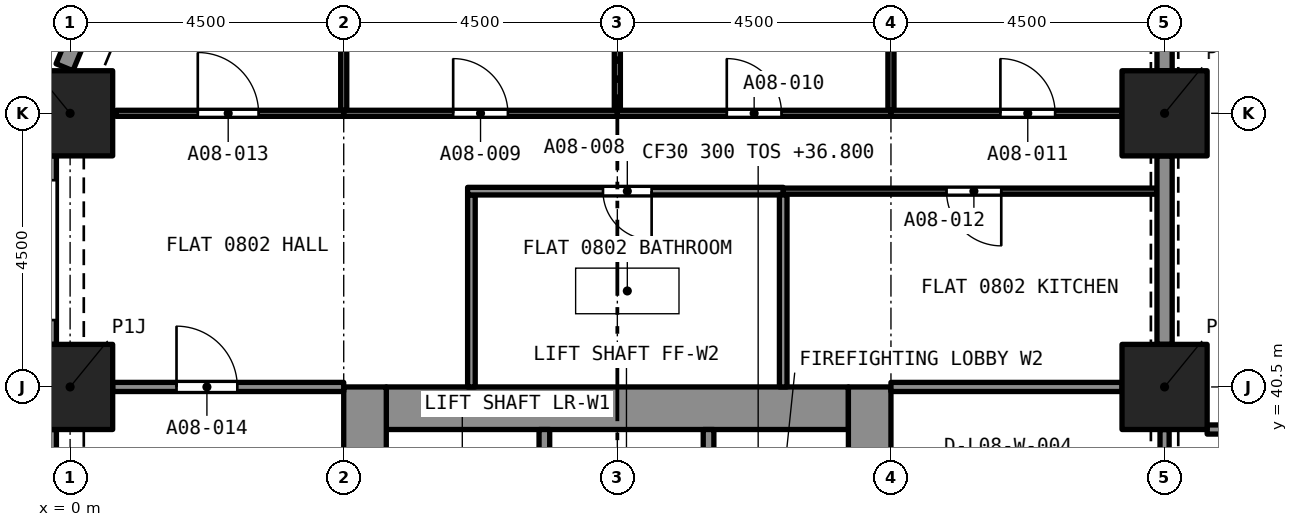
"""IFC4 building model, lengths in metres.
Left out: names, types, materials, properties, quantities, classifications, styles, units other than length and angle.
Written with IfcOpenShell. Run it as: python <this file> out.ifc"""

import sys

from ifc_helpers import new_model, si_unit, direction, frame, frame_2d, origin, origin_2d, place, context, subcontext, project, spatial, rectangle, extrude, element, fill, save


model = new_model("IFC4")
c1 = context("Model", 3, precision=1e-05, world=origin(), true_north=direction((0.0, 1.0)))
c2 = subcontext(c1, "Body", "Model", "MODEL_VIEW")
j1 = project(units=[si_unit("LENGTHUNIT", "METRE"), si_unit("PLANEANGLEUNIT", "RADIAN")], contexts=[c1])
p1 = place(None, origin())
s1 = spatial("IfcSite", under=j1, at=p1, CompositionType="ELEMENT")
p2 = place(p1, origin())
s2 = spatial("IfcBuilding", under=s1, at=p2, CompositionType="ELEMENT")
p3 = place(p2, frame((0.0, 0.0, 36.8)))
s3 = spatial("IfcBuildingStorey", under=s2, at=p3, CompositionType="ELEMENT", Elevation=36.8)
for number, where, z_axis, x_axis in (
    (1, (0.0, 40.5, 0.0), (0.0, 0.0, 1.0), (1.0, 0.0, 0.0)),
    (2, (18.0, 40.5, 0.0), (0.0, 0.0, 1.0), (1.0, 0.0, 0.0)),
    (3, (0.0, 45.0, 0.0), (0.0, 0.0, 1.0), (1.0, 0.0, 0.0)),
    (4, (18.0, 45.0, 0.0), (0.0, 0.0, 1.0), (1.0, 0.0, 0.0)),
):
    element("IfcColumn", number, at=place(p3, frame(where, z_axis=z_axis, x_axis=x_axis)), inside=s3, PredefinedType="COLUMN", context=c2, shape_type="SweptSolid", body=[
        extrude(rectangle(XDim=1.4, YDim=1.4, at=origin_2d()), origin(), (0.0, 0.0, 1.0), 3.2),
    ])
p4 = place(p3, frame((5.2, 40.15, 0.0), z_axis=(0.0, 0.0, 1.0), x_axis=(1.0, 0.0, 0.0)))
e5 = element("IfcWall", 5, at=p4, inside=s3, PredefinedType="SOLIDWALL", context=c2, shape_type="SweptSolid", body=[
    extrude(rectangle(XDim=7.6, YDim=0.7, at=frame_2d((3.8, 0.0))), origin(), (0.0, 0.0, 1.0), 3.2),
])
p5 = place(p3, frame((4.85, 27.0, 0.0), z_axis=(0.0, 0.0, 1.0), x_axis=(0.0, 1.0, 0.0)))
e6 = element("IfcWall", 6, at=p5, inside=s3, PredefinedType="SOLIDWALL", context=c2, shape_type="SweptSolid", body=[
    extrude(rectangle(XDim=13.5, YDim=0.7, at=frame_2d((6.75, 0.0))), origin(), (0.0, 0.0, 1.0), 3.2),
])
p6 = place(p5, frame((8.95, 0.0, 0.0)))
e7 = element("IfcOpeningElement", 7, at=p6, cuts=e6, PredefinedType="OPENING", context=c2, shape_type="SweptSolid", body=[
    extrude(rectangle(XDim=1.2, YDim=2.1, at=frame_2d((0.6, 1.05))), frame((0.0, 0.36, 0.0), z_axis=(0.0, -1.0, 0.0), x_axis=(1.0, 0.0, 0.0)), (0.0, 0.0, 1.0), 0.72),
])
p7 = place(p3, frame((13.15, 27.0, 0.0), z_axis=(0.0, 0.0, 1.0), x_axis=(0.0, 1.0, 0.0)))
e8 = element("IfcWall", 8, at=p7, inside=s3, PredefinedType="SOLIDWALL", context=c2, shape_type="SweptSolid", body=[
    extrude(rectangle(XDim=13.5, YDim=0.7, at=frame_2d((6.75, 0.0))), origin(), (0.0, 0.0, 1.0), 3.2),
])
p8 = place(p7, frame((11.1, 0.0, 0.0)))
e9 = element("IfcOpeningElement", 9, at=p8, cuts=e8, PredefinedType="OPENING", context=c2, shape_type="SweptSolid", body=[
    extrude(rectangle(XDim=1.1, YDim=2.1, at=frame_2d((0.55, 1.05))), frame((0.0, 0.36, 0.0), z_axis=(0.0, -1.0, 0.0), x_axis=(1.0, 0.0, 0.0)), (0.0, 0.0, 1.0), 0.72),
])
p9 = place(p7, frame((8.95, 0.0, 0.0)))
e10 = element("IfcOpeningElement", 10, at=p9, cuts=e8, PredefinedType="OPENING", context=c2, shape_type="SweptSolid", body=[
    extrude(rectangle(XDim=1.2, YDim=2.1, at=frame_2d((0.6, 1.05))), frame((0.0, 0.36, 0.0), z_axis=(0.0, -1.0, 0.0), x_axis=(1.0, 0.0, 0.0)), (0.0, 0.0, 1.0), 0.72),
])
p10 = place(p3, frame((-0.092, 45.757, 0.0), z_axis=(0.0, 0.0, 1.0), x_axis=(0.382737135771, 0.923857286003, 0.0)))
e11 = element("IfcWall", 11, at=p10, inside=s3, PredefinedType="SOLIDWALL", context=c2, shape_type="SweptSolid", body=[
    extrude(rectangle(XDim=1.865, YDim=0.3, at=frame_2d((0.933, 0.0))), origin(), (0.0, 0.0, 1.0), 3.2),
])
p11 = place(p10, frame((0.508, 0.0, 0.45)))
e12 = element("IfcOpeningElement", 12, at=p11, cuts=e11, PredefinedType="OPENING", context=c2, shape_type="SweptSolid", body=[
    extrude(rectangle(XDim=1.1, YDim=1.95, at=frame_2d((0.55, 0.975))), frame((0.0, 0.16, 0.0), z_axis=(0.0, -1.0, 0.0), x_axis=(1.0, 0.0, 0.0)), (0.0, 0.0, 1.0), 0.32),
])
p12 = place(p3, frame((-0.375, 41.2, 0.0), z_axis=(0.0, 0.0, 1.0), x_axis=(0.0, 1.0, 0.0)))
e13 = element("IfcWall", 13, at=p12, inside=s3, PredefinedType="SOLIDWALL", context=c2, shape_type="SweptSolid", body=[
    extrude(rectangle(XDim=3.1, YDim=0.3, at=frame_2d((1.55, 0.0))), origin(), (0.0, 0.0, 1.0), 3.2),
])
p13 = place(p12, frame((0.4, 0.0, 0.45)))
e14 = element("IfcOpeningElement", 14, at=p13, cuts=e13, PredefinedType="OPENING", context=c2, shape_type="SweptSolid", body=[
    extrude(rectangle(XDim=2.3, YDim=1.95, at=frame_2d((1.15, 0.975))), frame((0.0, 0.16, 0.0), z_axis=(0.0, -1.0, 0.0), x_axis=(1.0, 0.0, 0.0)), (0.0, 0.0, 1.0), 0.32),
])
p14 = place(p3, frame((-0.375, 36.7, 0.0), z_axis=(0.0, 0.0, 1.0), x_axis=(0.0, 1.0, 0.0)))
e15 = element("IfcWall", 15, at=p14, inside=s3, PredefinedType="SOLIDWALL", context=c2, shape_type="SweptSolid", body=[
    extrude(rectangle(XDim=3.1, YDim=0.3, at=frame_2d((1.55, 0.0))), origin(), (0.0, 0.0, 1.0), 3.2),
])
p15 = place(p14, frame((0.4, 0.0, 0.45)))
e16 = element("IfcOpeningElement", 16, at=p15, cuts=e15, PredefinedType="OPENING", context=c2, shape_type="SweptSolid", body=[
    extrude(rectangle(XDim=2.3, YDim=1.95, at=frame_2d((1.15, 0.975))), frame((0.0, 0.16, 0.0), z_axis=(0.0, -1.0, 0.0), x_axis=(1.0, 0.0, 0.0)), (0.0, 0.0, 1.0), 0.32),
])
p16 = place(p3, frame((6.6, 40.5, 0.0), z_axis=(0.0, 0.0, 1.0), x_axis=(0.0, 1.0, 0.0)))
e17 = element("IfcWall", 17, at=p16, inside=s3, PredefinedType="PARTITIONING", context=c2, shape_type="SweptSolid", body=[
    extrude(rectangle(XDim=3.157, YDim=0.125, at=frame_2d((1.579, 0.0))), origin(), (0.0, 0.0, 1.0), 2.9),
])
p17 = place(p3, frame((11.728, 43.72, 0.0), z_axis=(0.0, 0.0, 1.0), x_axis=(-1.0, 0.0, 0.0)))
e18 = element("IfcWall", 18, at=p17, inside=s3, PredefinedType="PARTITIONING", context=c2, shape_type="SweptSolid", body=[
    extrude(rectangle(XDim=5.19, YDim=0.125, at=frame_2d((2.595, 0.0))), origin(), (0.0, 0.0, 1.0), 2.9),
])
p18 = place(p17, frame((2.164, 0.0, 0.0)))
e19 = element("IfcOpeningElement", 19, at=p18, cuts=e18, PredefinedType="OPENING", context=c2, shape_type="SweptSolid", body=[
    extrude(rectangle(XDim=0.8, YDim=2.1, at=frame_2d((0.4, 1.05))), frame((0.0, 0.073, 0.0), z_axis=(0.0, -1.0, 0.0), x_axis=(1.0, 0.0, 0.0)), (0.0, 0.0, 1.0), 0.145),
])
p19 = place(p3, frame((11.728, 40.5, 0.0), z_axis=(0.0, 0.0, 1.0), x_axis=(0.0, 1.0, 0.0)))
e20 = element("IfcWall", 20, at=p19, inside=s3, PredefinedType="PARTITIONING", context=c2, shape_type="SweptSolid", body=[
    extrude(rectangle(XDim=3.157, YDim=0.125, at=frame_2d((1.579, 0.0))), origin(), (0.0, 0.0, 1.0), 2.9),
])
p20 = place(p3, frame((9.0, 45.05, 0.0), z_axis=(0.0, 0.0, 1.0), x_axis=(0.0, 1.0, 0.0)))
e21 = element("IfcWall", 21, at=p20, inside=s3, PredefinedType="PARTITIONING", context=c2, shape_type="SweptSolid", body=[
    extrude(rectangle(XDim=3.75, YDim=0.1, at=frame_2d((1.875, 0.0))), origin(), (0.0, 0.0, 1.0), 2.9),
])
p21 = place(p3, frame((4.5, 45.0, 0.0), z_axis=(0.0, 0.0, 1.0), x_axis=(1.0, 0.0, 0.0)))
e22 = element("IfcWall", 22, at=p21, inside=s3, PredefinedType="PARTITIONING", context=c2, shape_type="SweptSolid", body=[
    extrude(rectangle(XDim=4.5, YDim=0.1, at=frame_2d((2.25, 0.0))), origin(), (0.0, 0.0, 1.0), 2.9),
])
p22 = place(p21, frame((1.8, 0.0, 0.0)))
e23 = element("IfcOpeningElement", 23, at=p22, cuts=e22, PredefinedType="OPENING", context=c2, shape_type="SweptSolid", body=[
    extrude(rectangle(XDim=0.9, YDim=2.1, at=frame_2d((0.45, 1.05))), frame((0.0, 0.06, 0.0), z_axis=(0.0, -1.0, 0.0), x_axis=(1.0, 0.0, 0.0)), (0.0, 0.0, 1.0), 0.12),
])
p23 = place(p3, frame((4.5, 45.05, 0.0), z_axis=(0.0, 0.0, 1.0), x_axis=(0.0, 1.0, 0.0)))
e24 = element("IfcWall", 24, at=p23, inside=s3, PredefinedType="PARTITIONING", context=c2, shape_type="SweptSolid", body=[
    extrude(rectangle(XDim=3.692, YDim=0.1, at=frame_2d((1.846, 0.0))), origin(), (0.0, 0.0, 1.0), 2.9),
])
p24 = place(p3, frame((13.5, 45.05, 0.0), z_axis=(0.0, 0.0, 1.0), x_axis=(0.0, 1.0, 0.0)))
e25 = element("IfcWall", 25, at=p24, inside=s3, PredefinedType="PARTITIONING", context=c2, shape_type="SweptSolid", body=[
    extrude(rectangle(XDim=3.75, YDim=0.1, at=frame_2d((1.875, 0.0))), origin(), (0.0, 0.0, 1.0), 2.9),
])
p25 = place(p3, frame((9.0, 45.0, 0.0), z_axis=(0.0, 0.0, 1.0), x_axis=(1.0, 0.0, 0.0)))
e26 = element("IfcWall", 26, at=p25, inside=s3, PredefinedType="PARTITIONING", context=c2, shape_type="SweptSolid", body=[
    extrude(rectangle(XDim=4.5, YDim=0.1, at=frame_2d((2.25, 0.0))), origin(), (0.0, 0.0, 1.0), 2.9),
])
p26 = place(p25, frame((1.8, 0.0, 0.0)))
e27 = element("IfcOpeningElement", 27, at=p26, cuts=e26, PredefinedType="OPENING", context=c2, shape_type="SweptSolid", body=[
    extrude(rectangle(XDim=0.9, YDim=2.1, at=frame_2d((0.45, 1.05))), frame((0.0, 0.06, 0.0), z_axis=(0.0, -1.0, 0.0), x_axis=(1.0, 0.0, 0.0)), (0.0, 0.0, 1.0), 0.12),
])
p27 = place(p3, frame((13.5, 45.0, 0.0), z_axis=(0.0, 0.0, 1.0), x_axis=(1.0, 0.0, 0.0)))
e28 = element("IfcWall", 28, at=p27, inside=s3, PredefinedType="PARTITIONING", context=c2, shape_type="SweptSolid", body=[
    extrude(rectangle(XDim=3.8, YDim=0.1, at=frame_2d((1.9, 0.0))), origin(), (0.0, 0.0, 1.0), 2.9),
])
p28 = place(p27, frame((1.8, 0.0, 0.0)))
e29 = element("IfcOpeningElement", 29, at=p28, cuts=e28, PredefinedType="OPENING", context=c2, shape_type="SweptSolid", body=[
    extrude(rectangle(XDim=0.9, YDim=2.1, at=frame_2d((0.45, 1.05))), frame((0.0, 0.06, 0.0), z_axis=(0.0, -1.0, 0.0), x_axis=(1.0, 0.0, 0.0)), (0.0, 0.0, 1.0), 0.12),
])
p29 = place(p3, frame((18.0, 45.7, 0.0), z_axis=(0.0, 0.0, 1.0), x_axis=(0.0, 1.0, 0.0)))
e30 = element("IfcWall", 30, at=p29, inside=s3, PredefinedType="PARTITIONING", context=c2, shape_type="SweptSolid", body=[
    extrude(rectangle(XDim=3.1, YDim=0.25, at=frame_2d((1.55, 0.0))), origin(), (0.0, 0.0, 1.0), 2.38),
])
p30 = place(p3, frame((17.875, 43.72, 0.0), z_axis=(0.0, 0.0, 1.0), x_axis=(-1.0, 0.0, 0.0)))
e31 = element("IfcWall", 31, at=p30, inside=s3, PredefinedType="PARTITIONING", context=c2, shape_type="SweptSolid", body=[
    extrude(rectangle(XDim=6.147, YDim=0.1, at=frame_2d((3.073, 0.0))), origin(), (0.0, 0.0, 1.0), 2.9),
])
p31 = place(p30, frame((2.561, 0.0, 0.0)))
e32 = element("IfcOpeningElement", 32, at=p31, cuts=e31, PredefinedType="OPENING", context=c2, shape_type="SweptSolid", body=[
    extrude(rectangle(XDim=0.9, YDim=2.1, at=frame_2d((0.45, 1.05))), frame((0.0, 0.06, 0.0), z_axis=(0.0, -1.0, 0.0), x_axis=(1.0, 0.0, 0.0)), (0.0, 0.0, 1.0), 0.12),
])
p32 = place(p3, frame((0.758, 45.0, 0.0), z_axis=(0.0, 0.0, 1.0), x_axis=(1.0, 0.0, 0.0)))
e33 = element("IfcWall", 33, at=p32, inside=s3, PredefinedType="PARTITIONING", context=c2, shape_type="SweptSolid", body=[
    extrude(rectangle(XDim=3.742, YDim=0.1, at=frame_2d((1.871, 0.0))), origin(), (0.0, 0.0, 1.0), 2.9),
])
p33 = place(p32, frame((1.342, 0.0, 0.0)))
e34 = element("IfcOpeningElement", 34, at=p33, cuts=e33, PredefinedType="OPENING", context=c2, shape_type="SweptSolid", body=[
    extrude(rectangle(XDim=1.0, YDim=2.1, at=frame_2d((0.5, 1.05))), frame((0.0, 0.06, 0.0), z_axis=(0.0, -1.0, 0.0), x_axis=(1.0, 0.0, 0.0)), (0.0, 0.0, 1.0), 0.12),
])
p34 = place(p3, frame((0.7, 40.5, 0.0), z_axis=(0.0, 0.0, 1.0), x_axis=(1.0, 0.0, 0.0)))
e35 = element("IfcWall", 35, at=p34, inside=s3, PredefinedType="PARTITIONING", context=c2, shape_type="SweptSolid", body=[
    extrude(rectangle(XDim=3.8, YDim=0.15, at=frame_2d((1.9, 0.0))), origin(), (0.0, 0.0, 1.0), 2.9),
])
p35 = place(p34, frame((1.05, 0.0, 0.0)))
e36 = element("IfcOpeningElement", 36, at=p35, cuts=e35, PredefinedType="OPENING", context=c2, shape_type="SweptSolid", body=[
    extrude(rectangle(XDim=1.0, YDim=2.1, at=frame_2d((0.5, 1.05))), frame((0.0, 0.085, 0.0), z_axis=(0.0, -1.0, 0.0), x_axis=(1.0, 0.0, 0.0)), (0.0, 0.0, 1.0), 0.17),
])
p36 = place(p3, frame((18.0, 41.2, 0.0), z_axis=(0.0, 0.0, 1.0), x_axis=(0.0, 1.0, 0.0)))
e37 = element("IfcWall", 37, at=p36, inside=s3, PredefinedType="PARTITIONING", context=c2, shape_type="SweptSolid", body=[
    extrude(rectangle(XDim=3.1, YDim=0.25, at=frame_2d((1.55, 0.0))), origin(), (0.0, 0.0, 1.0), 2.38),
])
p37 = place(p3, frame((13.5, 40.5, 0.0), z_axis=(0.0, 0.0, 1.0), x_axis=(1.0, 0.0, 0.0)))
e38 = element("IfcWall", 38, at=p37, inside=s3, PredefinedType="PARTITIONING", context=c2, shape_type="SweptSolid", body=[
    extrude(rectangle(XDim=3.8, YDim=0.15, at=frame_2d((1.9, 0.0))), origin(), (0.0, 0.0, 1.0), 2.9),
])
p38 = place(p3, frame((18.7, 39.8, 0.0), z_axis=(0.0, 0.0, 1.0), x_axis=(1.0, 0.0, 0.0)))
e39 = element("IfcWall", 39, at=p38, inside=s3, PredefinedType="PARTITIONING", context=c2, shape_type="SweptSolid", body=[
    extrude(rectangle(XDim=12.1, YDim=0.15, at=frame_2d((6.05, 0.0))), origin(), (0.0, 0.0, 1.0), 2.75),
])
p39 = place(p38, frame((5.55, 0.0, 0.0)))
e40 = element("IfcOpeningElement", 40, at=p39, cuts=e39, PredefinedType="OPENING", context=c2, shape_type="SweptSolid", body=[
    extrude(rectangle(XDim=1.0, YDim=2.1, at=frame_2d((0.5, 1.05))), frame((0.0, 0.085, 0.0), z_axis=(0.0, -1.0, 0.0), x_axis=(1.0, 0.0, 0.0)), (0.0, 0.0, 1.0), 0.17),
])
p40 = place(p3, frame((18.0, 39.8, 0.0), z_axis=(0.0, 0.0, 1.0), x_axis=(0.0, -1.0, 0.0)))
e41 = element("IfcWall", 41, at=p40, inside=s3, PredefinedType="PARTITIONING", context=c2, shape_type="SweptSolid", body=[
    extrude(rectangle(XDim=3.1, YDim=0.15, at=frame_2d((1.55, 0.0))), origin(), (0.0, 0.0, 1.0), 2.38),
])
p41 = place(p40, frame((0.95, 0.0, 0.0)))
e42 = element("IfcOpeningElement", 42, at=p41, cuts=e41, PredefinedType="OPENING", context=c2, shape_type="SweptSolid", body=[
    extrude(rectangle(XDim=1.2, YDim=2.1, at=frame_2d((0.6, 1.05))), frame((0.0, 0.085, 0.0), z_axis=(0.0, -1.0, 0.0), x_axis=(1.0, 0.0, 0.0)), (0.0, 0.0, 1.0), 0.17),
])
p42 = place(p3, frame((7.8, 37.5, 0.0), z_axis=(0.0, 0.0, 1.0), x_axis=(0.0, 1.0, 0.0)))
e43 = element("IfcWall", 43, at=p42, inside=s3, PredefinedType="SOLIDWALL", context=c2, shape_type="SweptSolid", body=[
    extrude(rectangle(XDim=2.3, YDim=0.175, at=frame_2d((1.15, 0.0))), origin(), (0.0, 0.0, 1.0), 2.9),
])
p43 = place(p3, frame((10.5, 37.5, 0.0), z_axis=(0.0, 0.0, 1.0), x_axis=(0.0, 1.0, 0.0)))
e44 = element("IfcWall", 44, at=p43, inside=s3, PredefinedType="SOLIDWALL", context=c2, shape_type="SweptSolid", body=[
    extrude(rectangle(XDim=2.3, YDim=0.175, at=frame_2d((1.15, 0.0))), origin(), (0.0, 0.0, 1.0), 2.9),
])
p44 = place(p43, frame((0.65, 0.0, 0.0)))
e45 = element("IfcOpeningElement", 45, at=p44, cuts=e44, PredefinedType="OPENING", context=c2, shape_type="SweptSolid", body=[
    extrude(rectangle(XDim=1.0, YDim=2.1, at=frame_2d((0.5, 1.05))), frame((0.0, 0.097, 0.0), z_axis=(0.0, -1.0, 0.0), x_axis=(1.0, 0.0, 0.0)), (0.0, 0.0, 1.0), 0.195),
])
p45 = place(p18, origin())
e46 = element("IfcDoor", 46, at=p45, inside=s3, OperationType="SINGLE_SWING_LEFT", PredefinedType="DOOR", context=c2, shape_type="SweptSolid", body=[
    extrude(rectangle(XDim=0.8, YDim=2.1, at=frame_2d((0.4, 1.05))), frame((0.0, 0.025, 0.0), z_axis=(0.0, -1.0, 0.0), x_axis=(1.0, 0.0, 0.0)), (0.0, 0.0, 1.0), 0.05),
])
fill(e19, e46)
p46 = place(p22, origin())
e47 = element("IfcDoor", 47, at=p46, inside=s3, OperationType="SINGLE_SWING_RIGHT", PredefinedType="DOOR", context=c2, shape_type="SweptSolid", body=[
    extrude(rectangle(XDim=0.9, YDim=2.1, at=frame_2d((0.45, 1.05))), frame((0.0, 0.025, 0.0), z_axis=(0.0, -1.0, 0.0), x_axis=(1.0, 0.0, 0.0)), (0.0, 0.0, 1.0), 0.05),
])
fill(e23, e47)
p47 = place(p26, origin())
e48 = element("IfcDoor", 48, at=p47, inside=s3, OperationType="SINGLE_SWING_LEFT", PredefinedType="DOOR", context=c2, shape_type="SweptSolid", body=[
    extrude(rectangle(XDim=0.9, YDim=2.1, at=frame_2d((0.45, 1.05))), frame((0.0, 0.025, 0.0), z_axis=(0.0, -1.0, 0.0), x_axis=(1.0, 0.0, 0.0)), (0.0, 0.0, 1.0), 0.05),
])
fill(e27, e48)
p48 = place(p28, origin())
e49 = element("IfcDoor", 49, at=p48, inside=s3, OperationType="SINGLE_SWING_RIGHT", PredefinedType="DOOR", context=c2, shape_type="SweptSolid", body=[
    extrude(rectangle(XDim=0.9, YDim=2.1, at=frame_2d((0.45, 1.05))), frame((0.0, 0.025, 0.0), z_axis=(0.0, -1.0, 0.0), x_axis=(1.0, 0.0, 0.0)), (0.0, 0.0, 1.0), 0.05),
])
fill(e29, e49)
p49 = place(p31, origin())
e50 = element("IfcDoor", 50, at=p49, inside=s3, OperationType="SINGLE_SWING_LEFT", PredefinedType="DOOR", context=c2, shape_type="SweptSolid", body=[
    extrude(rectangle(XDim=0.9, YDim=2.1, at=frame_2d((0.45, 1.05))), frame((0.0, 0.025, 0.0), z_axis=(0.0, -1.0, 0.0), x_axis=(1.0, 0.0, 0.0)), (0.0, 0.0, 1.0), 0.05),
])
fill(e32, e50)
p50 = place(p33, origin())
e51 = element("IfcDoor", 51, at=p50, inside=s3, OperationType="SINGLE_SWING_LEFT", PredefinedType="DOOR", context=c2, shape_type="SweptSolid", body=[
    extrude(rectangle(XDim=1.0, YDim=2.1, at=frame_2d((0.5, 1.05))), frame((0.0, 0.025, 0.0), z_axis=(0.0, -1.0, 0.0), x_axis=(1.0, 0.0, 0.0)), (0.0, 0.0, 1.0), 0.05),
])
fill(e34, e51)
p51 = place(p35, origin())
e52 = element("IfcDoor", 52, at=p51, inside=s3, OperationType="SINGLE_SWING_LEFT", PredefinedType="DOOR", context=c2, shape_type="SweptSolid", body=[
    extrude(rectangle(XDim=1.0, YDim=2.1, at=frame_2d((0.5, 1.05))), frame((0.0, 0.025, 0.0), z_axis=(0.0, -1.0, 0.0), x_axis=(1.0, 0.0, 0.0)), (0.0, 0.0, 1.0), 0.05),
])
fill(e36, e52)
save(model, sys.argv[1])
